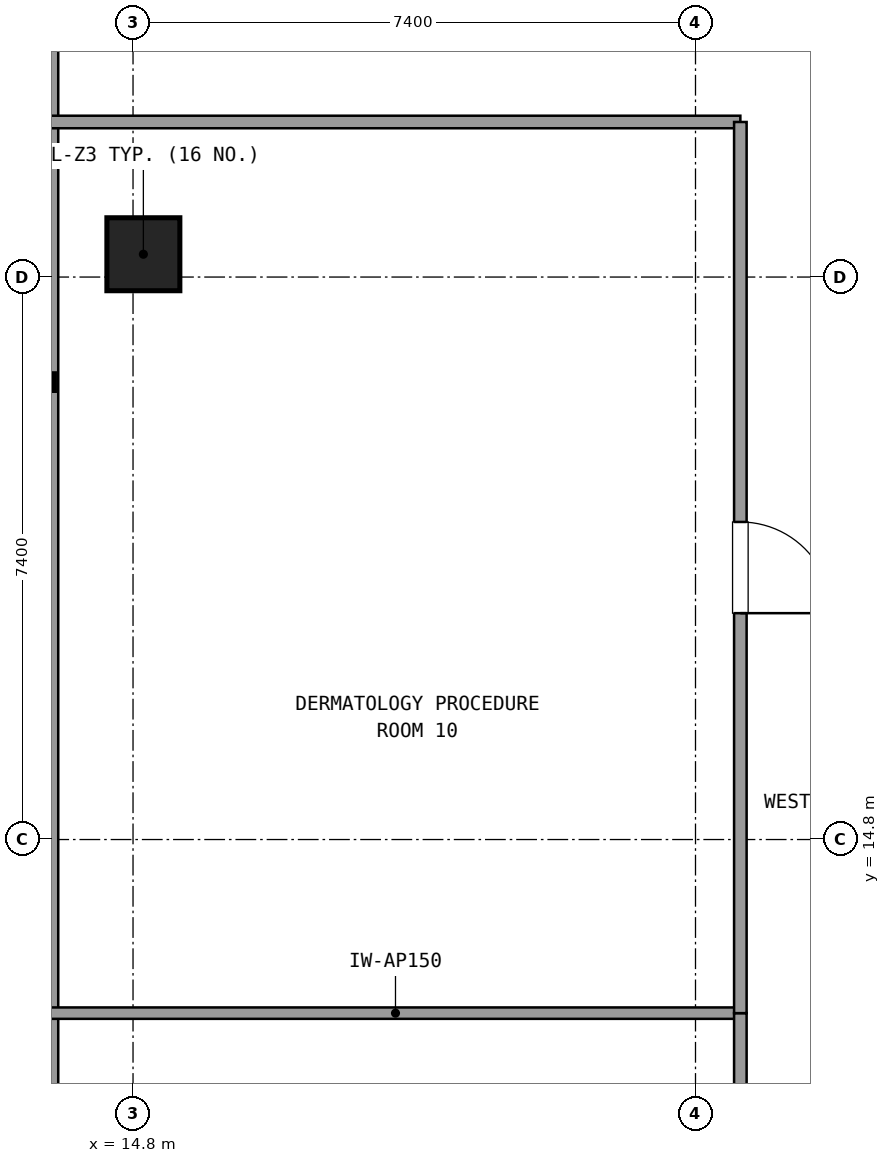
"""IFC4 building model, lengths in metres.
Left out: names, types, materials, properties, quantities, classifications, styles, units other than length and angle.
Written with IfcOpenShell. Run it as: python <this file> out.ifc"""

import sys

from ifc_helpers import new_model, si_unit, direction, frame, frame_2d, origin, origin_2d, place, context, subcontext, project, spatial, rectangle, extrude, element, fill, save


model = new_model("IFC4")
c1 = context("Model", 3, precision=1e-05, world=origin(), true_north=direction((0.0, 1.0)))
c2 = subcontext(c1, "Body", "Model", "MODEL_VIEW")
j1 = project(units=[si_unit("LENGTHUNIT", "METRE"), si_unit("PLANEANGLEUNIT", "RADIAN")], contexts=[c1])
p1 = place(None, origin())
s1 = spatial("IfcSite", under=j1, at=p1, CompositionType="ELEMENT")
p2 = place(p1, origin())
s2 = spatial("IfcBuilding", under=s1, at=p2, CompositionType="ELEMENT")
p3 = place(p2, frame((0.0, 0.0, 145.62)))
s3 = spatial("IfcBuildingStorey", under=s2, at=p3, CompositionType="ELEMENT", Elevation=145.62)
p4 = place(p3, frame((14.936, 22.5, 0.0), z_axis=(0.0, 0.0, 1.0), x_axis=(1.0, 0.0, 0.0)))
e1 = element("IfcColumn", 1, at=p4, inside=s3, PredefinedType="COLUMN", context=c2, shape_type="SweptSolid", body=[
    extrude(rectangle(XDim=0.96, YDim=0.96, at=origin_2d()), origin(), (0.0, 0.0, 1.0), 3.6),
])
p5 = place(p3, frame((13.696, 41.145, 0.0), z_axis=(0.0, 0.0, 1.0), x_axis=(0.0, -1.0, 0.0)))
e2 = element("IfcWall", 2, at=p5, inside=s3, PredefinedType="SOLIDWALL", context=c2, shape_type="SweptSolid", body=[
    extrude(rectangle(XDim=30.49, YDim=0.24, at=frame_2d((15.245, 0.0))), origin(), (0.0, 0.0, 1.0), 0.85),
])
p6 = place(p3, frame((13.716, 24.24, 0.0), z_axis=(0.0, 0.0, 1.0), x_axis=(1.0, 0.0, 0.0)))
e3 = element("IfcWall", 3, at=p6, inside=s3, PredefinedType="PARTITIONING", context=c2, shape_type="SweptSolid", body=[
    extrude(rectangle(XDim=9.074, YDim=0.165, at=frame_2d((4.537, 0.0))), origin(), (0.0, 0.0, 1.0), 2.61),
])
p7 = place(p3, frame((22.79, 12.516, 0.0), z_axis=(0.0, 0.0, 1.0), x_axis=(-1.0, 0.0, 0.0)))
e4 = element("IfcWall", 4, at=p7, inside=s3, PredefinedType="PARTITIONING", context=c2, shape_type="SweptSolid", body=[
    extrude(rectangle(XDim=9.074, YDim=0.15, at=frame_2d((4.537, 0.0))), origin(), (0.0, 0.0, 1.0), 2.61),
])
p8 = place(p3, frame((22.79, 4.7, 0.0), z_axis=(0.0, 0.0, 1.0), x_axis=(0.0, 1.0, 0.0)))
e5 = element("IfcWall", 5, at=p8, inside=s3, PredefinedType="PARTITIONING", context=c2, shape_type="SweptSolid", body=[
    extrude(rectangle(XDim=7.816, YDim=0.165, at=frame_2d((3.908, 0.0))), origin(), (0.0, 0.0, 1.0), 2.61),
])
p9 = place(p8, frame((3.308, 0.0, 0.0)))
e6 = element("IfcOpeningElement", 6, at=p9, cuts=e5, PredefinedType="OPENING", context=c2, shape_type="SweptSolid", body=[
    extrude(rectangle(XDim=1.2, YDim=2.15, at=frame_2d((0.6, 1.075))), frame((0.0, 0.093, 0.0), z_axis=(0.0, -1.0, 0.0), x_axis=(1.0, 0.0, 0.0)), (0.0, 0.0, 1.0), 0.185),
])
p10 = place(p3, frame((22.79, 12.516, 0.0), z_axis=(0.0, 0.0, 1.0), x_axis=(0.0, 1.0, 0.0)))
e7 = element("IfcWall", 7, at=p10, inside=s3, PredefinedType="PARTITIONING", context=c2, shape_type="SweptSolid", body=[
    extrude(rectangle(XDim=11.724, YDim=0.165, at=frame_2d((5.862, 0.0))), origin(), (0.0, 0.0, 1.0), 2.61),
])
p11 = place(p10, frame((5.262, 0.0, 0.0)))
e8 = element("IfcOpeningElement", 8, at=p11, cuts=e7, PredefinedType="OPENING", context=c2, shape_type="SweptSolid", body=[
    extrude(rectangle(XDim=1.2, YDim=2.15, at=frame_2d((0.6, 1.075))), frame((0.0, 0.093, 0.0), z_axis=(0.0, -1.0, 0.0), x_axis=(1.0, 0.0, 0.0)), (0.0, 0.0, 1.0), 0.185),
])
p12 = place(p11, frame((1.2, 0.0, 0.0), z_axis=(0.0, 0.0, 1.0), x_axis=(-1.0, 0.0, 0.0)))
e9 = element("IfcDoor", 9, at=p12, inside=s3, OperationType="SINGLE_SWING_LEFT", PredefinedType="DOOR", context=c2, shape_type="SweptSolid", body=[
    extrude(rectangle(XDim=1.2, YDim=2.15, at=frame_2d((0.6, 1.075))), frame((0.0, 0.025, 0.0), z_axis=(0.0, -1.0, 0.0), x_axis=(1.0, 0.0, 0.0)), (0.0, 0.0, 1.0), 0.05),
])
fill(e8, e9)
save(model, sys.argv[1])
